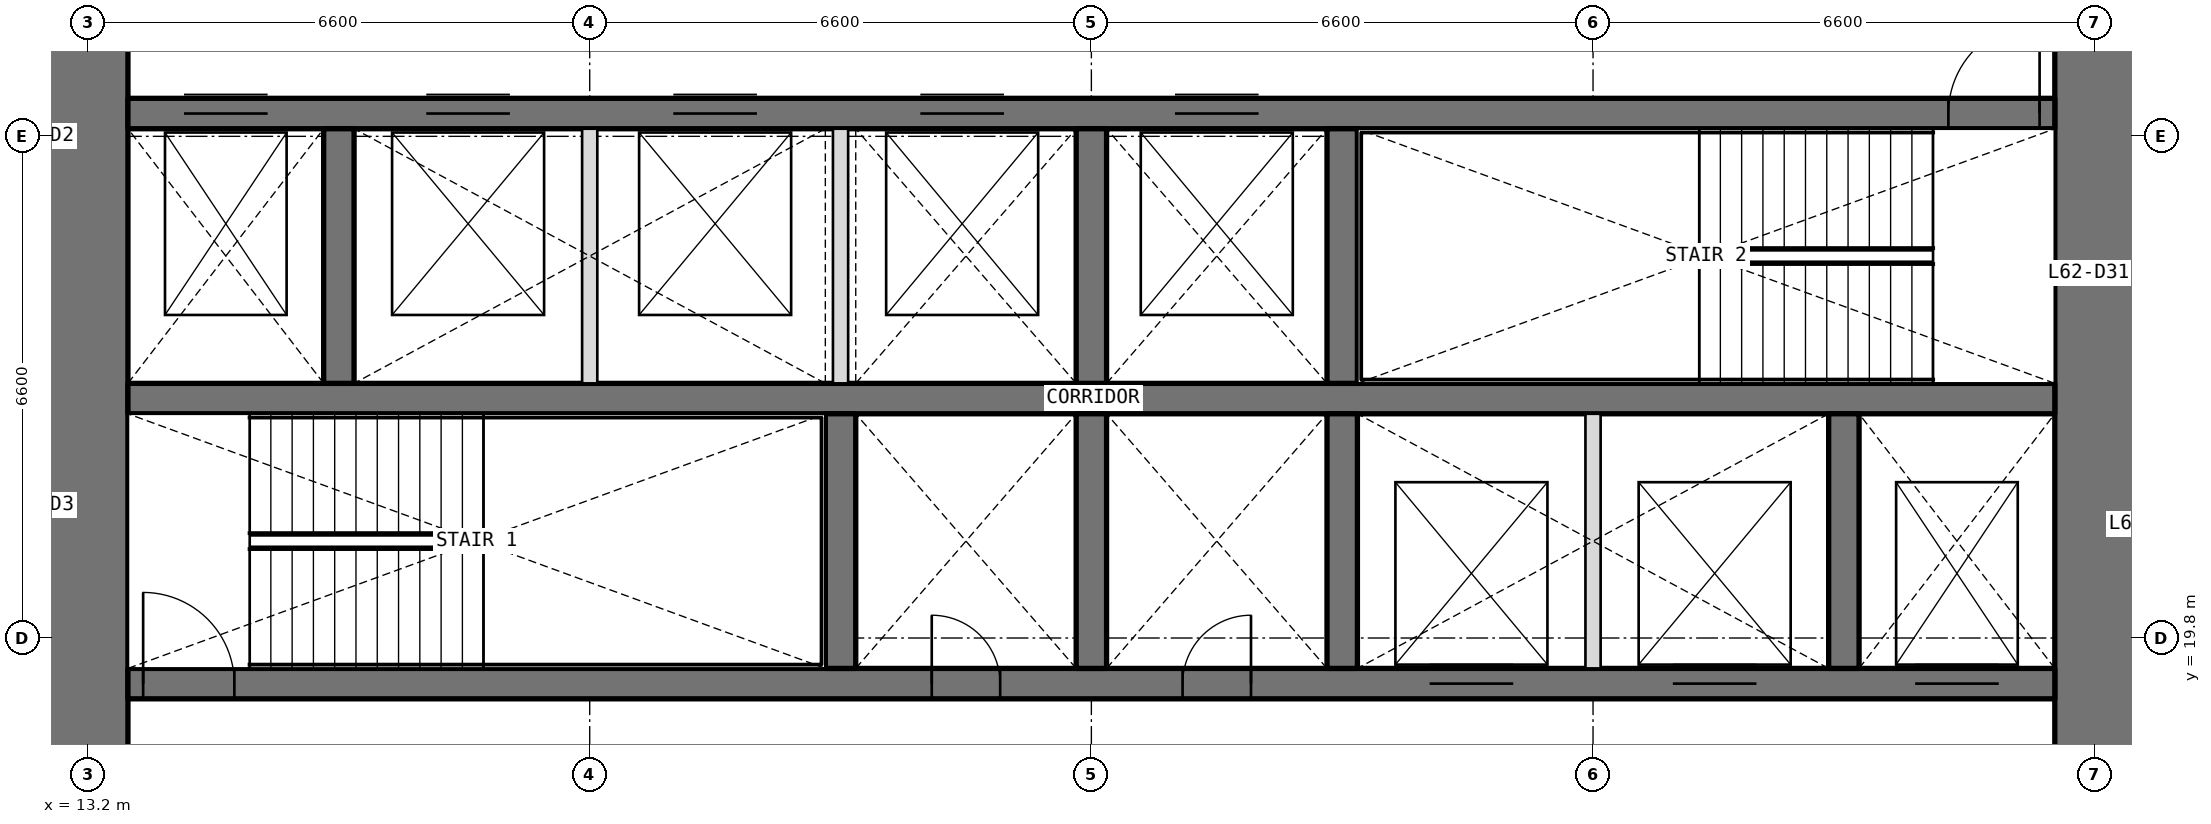
"""IFC4 building model, lengths in metres.
Left out: names, types, materials, properties, quantities, classifications, styles, units other than length and angle.
Written with IfcOpenShell. Run it as: python <this file> out.ifc"""

import sys

from ifc_helpers import new_model, si_unit, direction, frame, frame_2d, origin, place, context, subcontext, project, spatial, rectangle, extrude, element, fill, save


model = new_model("IFC4")
c1 = context("Model", 3, precision=1e-05, world=origin(), true_north=direction((0.0, 1.0)))
c2 = subcontext(c1, "Body", "Model", "MODEL_VIEW")
j1 = project(units=[si_unit("LENGTHUNIT", "METRE"), si_unit("PLANEANGLEUNIT", "RADIAN")], contexts=[c1])
p1 = place(None, origin())
s1 = spatial("IfcSite", under=j1, at=p1, CompositionType="ELEMENT")
p2 = place(p1, origin())
s2 = spatial("IfcBuilding", under=s1, at=p2, CompositionType="ELEMENT")
p3 = place(p2, frame((0.0, 0.0, 271.2)))
s3 = spatial("IfcBuildingStorey", under=s2, at=p3, CompositionType="ELEMENT", Elevation=271.2)
p4 = place(p3, frame((39.6, 13.725, 0.0), z_axis=(0.0, 0.0, 1.0), x_axis=(0.0, 1.0, 0.0)))
e1 = element("IfcWall", 1, at=p4, inside=s3, PredefinedType="SHEAR", context=c2, shape_type="SweptSolid", body=[
    extrude(rectangle(XDim=18.75, YDim=1.05, at=frame_2d((9.375, 0.0))), origin(), (0.0, 0.0, 1.0), 4.2),
])
p5 = place(p4, frame((3.025, 0.0, 0.0)))
e2 = element("IfcOpeningElement", 2, at=p5, cuts=e1, PredefinedType="OPENING", context=c2, shape_type="SweptSolid", body=[
    extrude(rectangle(XDim=1.6, YDim=2.1, at=frame_2d((0.8, 1.05))), frame((0.0, 0.535, 0.0), z_axis=(0.0, -1.0, 0.0), x_axis=(1.0, 0.0, 0.0)), (0.0, 0.0, 1.0), 1.07),
])
p6 = place(p4, frame((13.825, 0.0, 0.0)))
e3 = element("IfcOpeningElement", 3, at=p6, cuts=e1, PredefinedType="OPENING", context=c2, shape_type="SweptSolid", body=[
    extrude(rectangle(XDim=1.6, YDim=2.1, at=frame_2d((0.8, 1.05))), frame((0.0, 0.535, 0.0), z_axis=(0.0, -1.0, 0.0), x_axis=(1.0, 0.0, 0.0)), (0.0, 0.0, 1.0), 1.07),
])
p7 = place(p3, frame((13.2, 32.475, 0.0), z_axis=(0.0, 0.0, 1.0), x_axis=(0.0, -1.0, 0.0)))
e4 = element("IfcWall", 4, at=p7, inside=s3, PredefinedType="SHEAR", context=c2, shape_type="SweptSolid", body=[
    extrude(rectangle(XDim=18.75, YDim=1.05, at=frame_2d((9.375, 0.0))), origin(), (0.0, 0.0, 1.0), 4.2),
])
p8 = place(p7, frame((14.125, 0.0, 0.0)))
e5 = element("IfcOpeningElement", 5, at=p8, cuts=e4, PredefinedType="OPENING", context=c2, shape_type="SweptSolid", body=[
    extrude(rectangle(XDim=1.6, YDim=2.1, at=frame_2d((0.8, 1.05))), frame((0.0, 0.535, 0.0), z_axis=(0.0, -1.0, 0.0), x_axis=(1.0, 0.0, 0.0)), (0.0, 0.0, 1.0), 1.07),
])
p9 = place(p7, frame((3.325, 0.0, 0.0)))
e6 = element("IfcOpeningElement", 6, at=p9, cuts=e4, PredefinedType="OPENING", context=c2, shape_type="SweptSolid", body=[
    extrude(rectangle(XDim=1.6, YDim=2.1, at=frame_2d((0.8, 1.05))), frame((0.0, 0.535, 0.0), z_axis=(0.0, -1.0, 0.0), x_axis=(1.0, 0.0, 0.0)), (0.0, 0.0, 1.0), 1.07),
])
p10 = place(p3, frame((13.725, 19.2, 0.0), z_axis=(0.0, 0.0, 1.0), x_axis=(1.0, 0.0, 0.0)))
e7 = element("IfcWall", 7, at=p10, inside=s3, PredefinedType="SHEAR", context=c2, shape_type="SweptSolid", body=[
    extrude(rectangle(XDim=25.35, YDim=0.4, at=frame_2d((12.675, 0.0))), origin(), (0.0, 0.0, 1.0), 4.2),
])
p11 = place(p10, frame((10.575, 0.0, 0.0)))
e8 = element("IfcOpeningElement", 8, at=p11, cuts=e7, PredefinedType="OPENING", context=c2, shape_type="SweptSolid", body=[
    extrude(rectangle(XDim=0.9, YDim=2.1, at=frame_2d((0.45, 1.05))), frame((0.0, 0.21, 0.0), z_axis=(0.0, -1.0, 0.0), x_axis=(1.0, 0.0, 0.0)), (0.0, 0.0, 1.0), 0.42),
])
p12 = place(p10, frame((13.875, 0.0, 0.0)))
e9 = element("IfcOpeningElement", 9, at=p12, cuts=e7, PredefinedType="OPENING", context=c2, shape_type="SweptSolid", body=[
    extrude(rectangle(XDim=0.9, YDim=2.1, at=frame_2d((0.45, 1.05))), frame((0.0, 0.21, 0.0), z_axis=(0.0, -1.0, 0.0), x_axis=(1.0, 0.0, 0.0)), (0.0, 0.0, 1.0), 0.42),
])
p13 = place(p10, frame((0.2, 0.0, 0.0)))
e10 = element("IfcOpeningElement", 10, at=p13, cuts=e7, PredefinedType="OPENING", context=c2, shape_type="SweptSolid", body=[
    extrude(rectangle(XDim=1.2, YDim=2.1, at=frame_2d((0.6, 1.05))), frame((0.0, 0.21, 0.0), z_axis=(0.0, -1.0, 0.0), x_axis=(1.0, 0.0, 0.0)), (0.0, 0.0, 1.0), 0.42),
])
p14 = place(p10, frame((23.512, 0.0, 0.0)))
e11 = element("IfcOpeningElement", 11, at=p14, cuts=e7, PredefinedType="OPENING", context=c2, shape_type="SweptSolid", body=[
    extrude(rectangle(XDim=1.1, YDim=2.1, at=frame_2d((0.55, 1.05))), frame((0.0, 0.21, 0.0), z_axis=(0.0, -1.0, 0.0), x_axis=(1.0, 0.0, 0.0)), (0.0, 0.0, 1.0), 0.42),
])
p15 = place(p10, frame((17.125, 0.0, 0.0)))
e12 = element("IfcOpeningElement", 12, at=p15, cuts=e7, PredefinedType="OPENING", context=c2, shape_type="SweptSolid", body=[
    extrude(rectangle(XDim=1.1, YDim=2.1, at=frame_2d((0.55, 1.05))), frame((0.0, 0.21, 0.0), z_axis=(0.0, -1.0, 0.0), x_axis=(1.0, 0.0, 0.0)), (0.0, 0.0, 1.0), 0.42),
])
p16 = place(p10, frame((20.325, 0.0, 0.0)))
e13 = element("IfcOpeningElement", 13, at=p16, cuts=e7, PredefinedType="OPENING", context=c2, shape_type="SweptSolid", body=[
    extrude(rectangle(XDim=1.1, YDim=2.1, at=frame_2d((0.55, 1.05))), frame((0.0, 0.21, 0.0), z_axis=(0.0, -1.0, 0.0), x_axis=(1.0, 0.0, 0.0)), (0.0, 0.0, 1.0), 0.42),
])
p17 = place(p3, frame((13.725, 22.95, 0.0), z_axis=(0.0, 0.0, 1.0), x_axis=(1.0, 0.0, 0.0)))
e14 = element("IfcWall", 14, at=p17, inside=s3, PredefinedType="SHEAR", context=c2, shape_type="SweptSolid", body=[
    extrude(rectangle(XDim=25.35, YDim=0.4, at=frame_2d((12.675, 0.0))), origin(), (0.0, 0.0, 1.0), 4.2),
])
p18 = place(p3, frame((13.725, 26.7, 0.0), z_axis=(0.0, 0.0, 1.0), x_axis=(1.0, 0.0, 0.0)))
e15 = element("IfcWall", 15, at=p18, inside=s3, PredefinedType="SHEAR", context=c2, shape_type="SweptSolid", body=[
    extrude(rectangle(XDim=25.35, YDim=0.4, at=frame_2d((12.675, 0.0))), origin(), (0.0, 0.0, 1.0), 4.2),
])
p19 = place(p18, frame((23.95, 0.0, 0.0)))
e16 = element("IfcOpeningElement", 16, at=p19, cuts=e15, PredefinedType="OPENING", context=c2, shape_type="SweptSolid", body=[
    extrude(rectangle(XDim=1.2, YDim=2.1, at=frame_2d((0.6, 1.05))), frame((0.0, 0.21, 0.0), z_axis=(0.0, -1.0, 0.0), x_axis=(1.0, 0.0, 0.0)), (0.0, 0.0, 1.0), 0.42),
])
p20 = place(p18, frame((0.738, 0.0, 0.0)))
e17 = element("IfcOpeningElement", 17, at=p20, cuts=e15, PredefinedType="OPENING", context=c2, shape_type="SweptSolid", body=[
    extrude(rectangle(XDim=1.1, YDim=2.1, at=frame_2d((0.55, 1.05))), frame((0.0, 0.21, 0.0), z_axis=(0.0, -1.0, 0.0), x_axis=(1.0, 0.0, 0.0)), (0.0, 0.0, 1.0), 0.42),
])
p21 = place(p18, frame((3.925, 0.0, 0.0)))
e18 = element("IfcOpeningElement", 18, at=p21, cuts=e15, PredefinedType="OPENING", context=c2, shape_type="SweptSolid", body=[
    extrude(rectangle(XDim=1.1, YDim=2.1, at=frame_2d((0.55, 1.05))), frame((0.0, 0.21, 0.0), z_axis=(0.0, -1.0, 0.0), x_axis=(1.0, 0.0, 0.0)), (0.0, 0.0, 1.0), 0.42),
])
p22 = place(p18, frame((7.175, 0.0, 0.0)))
e19 = element("IfcOpeningElement", 19, at=p22, cuts=e15, PredefinedType="OPENING", context=c2, shape_type="SweptSolid", body=[
    extrude(rectangle(XDim=1.1, YDim=2.1, at=frame_2d((0.55, 1.05))), frame((0.0, 0.21, 0.0), z_axis=(0.0, -1.0, 0.0), x_axis=(1.0, 0.0, 0.0)), (0.0, 0.0, 1.0), 0.42),
])
p23 = place(p18, frame((10.425, 0.0, 0.0)))
e20 = element("IfcOpeningElement", 20, at=p23, cuts=e15, PredefinedType="OPENING", context=c2, shape_type="SweptSolid", body=[
    extrude(rectangle(XDim=1.1, YDim=2.1, at=frame_2d((0.55, 1.05))), frame((0.0, 0.21, 0.0), z_axis=(0.0, -1.0, 0.0), x_axis=(1.0, 0.0, 0.0)), (0.0, 0.0, 1.0), 0.42),
])
p24 = place(p18, frame((13.775, 0.0, 0.0)))
e21 = element("IfcOpeningElement", 21, at=p24, cuts=e15, PredefinedType="OPENING", context=c2, shape_type="SweptSolid", body=[
    extrude(rectangle(XDim=1.1, YDim=2.1, at=frame_2d((0.55, 1.05))), frame((0.0, 0.21, 0.0), z_axis=(0.0, -1.0, 0.0), x_axis=(1.0, 0.0, 0.0)), (0.0, 0.0, 1.0), 0.42),
])
for number, where, z_axis, x_axis in (
    (22, (23.1, 19.4, 0.0), (0.0, 0.0, 1.0), (0.0, 1.0, 0.0)),
    (23, (26.4, 19.4, 0.0), (0.0, 0.0, 1.0), (0.0, 1.0, 0.0)),
    (24, (29.7, 19.4, 0.0), (0.0, 0.0, 1.0), (0.0, 1.0, 0.0)),
    (25, (36.3, 19.4, 0.0), (0.0, 0.0, 1.0), (0.0, 1.0, 0.0)),
    (26, (16.5, 23.15, 0.0), (0.0, 0.0, 1.0), (0.0, 1.0, 0.0)),
    (27, (26.4, 23.15, 0.0), (0.0, 0.0, 1.0), (0.0, 1.0, 0.0)),
    (28, (29.7, 23.15, 0.0), (0.0, 0.0, 1.0), (0.0, 1.0, 0.0)),
):
    element("IfcWall", number, at=place(p3, frame(where, z_axis=z_axis, x_axis=x_axis)), inside=s3, PredefinedType="SHEAR", context=c2, shape_type="SweptSolid", body=[
        extrude(rectangle(XDim=3.35, YDim=0.4, at=frame_2d((1.675, 0.0))), origin(), (0.0, 0.0, 1.0), 4.2),
    ])
for number, where, z_axis, x_axis in (
    (29, (33.0, 19.4, 0.0), (0.0, 0.0, 1.0), (0.0, 1.0, 0.0)),
    (30, (19.8, 23.15, 0.0), (0.0, 0.0, 1.0), (0.0, 1.0, 0.0)),
    (31, (23.1, 23.15, 0.0), (0.0, 0.0, 1.0), (0.0, 1.0, 0.0)),
):
    element("IfcWall", number, at=place(p3, frame(where, z_axis=z_axis, x_axis=x_axis)), inside=s3, PredefinedType="PARTITIONING", context=c2, shape_type="SweptSolid", body=[
        extrude(rectangle(XDim=3.35, YDim=0.2, at=frame_2d((1.675, 0.0))), origin(), (0.0, 0.0, 1.0), 4.2),
    ])
p25 = place(p11, origin())
e32 = element("IfcDoor", 32, at=p25, inside=s3, OperationType="SINGLE_SWING_LEFT", PredefinedType="DOOR", context=c2, shape_type="SweptSolid", body=[
    extrude(rectangle(XDim=0.9, YDim=2.1, at=frame_2d((0.45, 1.05))), frame((0.0, 0.025, 0.0), z_axis=(0.0, -1.0, 0.0), x_axis=(1.0, 0.0, 0.0)), (0.0, 0.0, 1.0), 0.05),
])
fill(e8, e32)
p26 = place(p12, origin())
e33 = element("IfcDoor", 33, at=p26, inside=s3, OperationType="SINGLE_SWING_RIGHT", PredefinedType="DOOR", context=c2, shape_type="SweptSolid", body=[
    extrude(rectangle(XDim=0.9, YDim=2.1, at=frame_2d((0.45, 1.05))), frame((0.0, 0.025, 0.0), z_axis=(0.0, -1.0, 0.0), x_axis=(1.0, 0.0, 0.0)), (0.0, 0.0, 1.0), 0.05),
])
fill(e9, e33)
p27 = place(p13, origin())
e34 = element("IfcDoor", 34, at=p27, inside=s3, OperationType="SINGLE_SWING_LEFT", PredefinedType="DOOR", context=c2, shape_type="SweptSolid", body=[
    extrude(rectangle(XDim=1.2, YDim=2.1, at=frame_2d((0.6, 1.05))), frame((0.0, 0.025, 0.0), z_axis=(0.0, -1.0, 0.0), x_axis=(1.0, 0.0, 0.0)), (0.0, 0.0, 1.0), 0.05),
])
fill(e10, e34)
p28 = place(p19, origin())
e35 = element("IfcDoor", 35, at=p28, inside=s3, OperationType="SINGLE_SWING_RIGHT", PredefinedType="DOOR", context=c2, shape_type="SweptSolid", body=[
    extrude(rectangle(XDim=1.2, YDim=2.1, at=frame_2d((0.6, 1.05))), frame((0.0, 0.025, 0.0), z_axis=(0.0, -1.0, 0.0), x_axis=(1.0, 0.0, 0.0)), (0.0, 0.0, 1.0), 0.05),
])
fill(e16, e35)
p29 = place(p20, origin())
e36 = element("IfcDoor", 36, at=p29, inside=s3, OperationType="DOUBLE_DOOR_SLIDING", PredefinedType="DOOR", context=c2, shape_type="SweptSolid", body=[
    extrude(rectangle(XDim=1.1, YDim=2.1, at=frame_2d((0.55, 1.05))), frame((0.0, 0.025, 0.0), z_axis=(0.0, -1.0, 0.0), x_axis=(1.0, 0.0, 0.0)), (0.0, 0.0, 1.0), 0.05),
])
fill(e17, e36)
p30 = place(p14, origin())
e37 = element("IfcDoor", 37, at=p30, inside=s3, OperationType="DOUBLE_DOOR_SLIDING", PredefinedType="DOOR", context=c2, shape_type="SweptSolid", body=[
    extrude(rectangle(XDim=1.1, YDim=2.1, at=frame_2d((0.55, 1.05))), frame((0.0, 0.025, 0.0), z_axis=(0.0, -1.0, 0.0), x_axis=(1.0, 0.0, 0.0)), (0.0, 0.0, 1.0), 0.05),
])
fill(e11, e37)
p31 = place(p15, origin())
e38 = element("IfcDoor", 38, at=p31, inside=s3, OperationType="DOUBLE_DOOR_SLIDING", PredefinedType="DOOR", context=c2, shape_type="SweptSolid", body=[
    extrude(rectangle(XDim=1.1, YDim=2.1, at=frame_2d((0.55, 1.05))), frame((0.0, 0.025, 0.0), z_axis=(0.0, -1.0, 0.0), x_axis=(1.0, 0.0, 0.0)), (0.0, 0.0, 1.0), 0.05),
])
fill(e12, e38)
p32 = place(p16, origin())
e39 = element("IfcDoor", 39, at=p32, inside=s3, OperationType="DOUBLE_DOOR_SLIDING", PredefinedType="DOOR", context=c2, shape_type="SweptSolid", body=[
    extrude(rectangle(XDim=1.1, YDim=2.1, at=frame_2d((0.55, 1.05))), frame((0.0, 0.025, 0.0), z_axis=(0.0, -1.0, 0.0), x_axis=(1.0, 0.0, 0.0)), (0.0, 0.0, 1.0), 0.05),
])
fill(e13, e39)
p33 = place(p21, origin())
e40 = element("IfcDoor", 40, at=p33, inside=s3, OperationType="DOUBLE_DOOR_SLIDING", PredefinedType="DOOR", context=c2, shape_type="SweptSolid", body=[
    extrude(rectangle(XDim=1.1, YDim=2.1, at=frame_2d((0.55, 1.05))), frame((0.0, 0.025, 0.0), z_axis=(0.0, -1.0, 0.0), x_axis=(1.0, 0.0, 0.0)), (0.0, 0.0, 1.0), 0.05),
])
fill(e18, e40)
p34 = place(p22, origin())
e41 = element("IfcDoor", 41, at=p34, inside=s3, OperationType="DOUBLE_DOOR_SLIDING", PredefinedType="DOOR", context=c2, shape_type="SweptSolid", body=[
    extrude(rectangle(XDim=1.1, YDim=2.1, at=frame_2d((0.55, 1.05))), frame((0.0, 0.025, 0.0), z_axis=(0.0, -1.0, 0.0), x_axis=(1.0, 0.0, 0.0)), (0.0, 0.0, 1.0), 0.05),
])
fill(e19, e41)
p35 = place(p23, origin())
e42 = element("IfcDoor", 42, at=p35, inside=s3, OperationType="DOUBLE_DOOR_SLIDING", PredefinedType="DOOR", context=c2, shape_type="SweptSolid", body=[
    extrude(rectangle(XDim=1.1, YDim=2.1, at=frame_2d((0.55, 1.05))), frame((0.0, 0.025, 0.0), z_axis=(0.0, -1.0, 0.0), x_axis=(1.0, 0.0, 0.0)), (0.0, 0.0, 1.0), 0.05),
])
fill(e20, e42)
p36 = place(p24, origin())
e43 = element("IfcDoor", 43, at=p36, inside=s3, OperationType="DOUBLE_DOOR_SLIDING", PredefinedType="DOOR", context=c2, shape_type="SweptSolid", body=[
    extrude(rectangle(XDim=1.1, YDim=2.1, at=frame_2d((0.55, 1.05))), frame((0.0, 0.025, 0.0), z_axis=(0.0, -1.0, 0.0), x_axis=(1.0, 0.0, 0.0)), (0.0, 0.0, 1.0), 0.05),
])
fill(e21, e43)
save(model, sys.argv[1])
